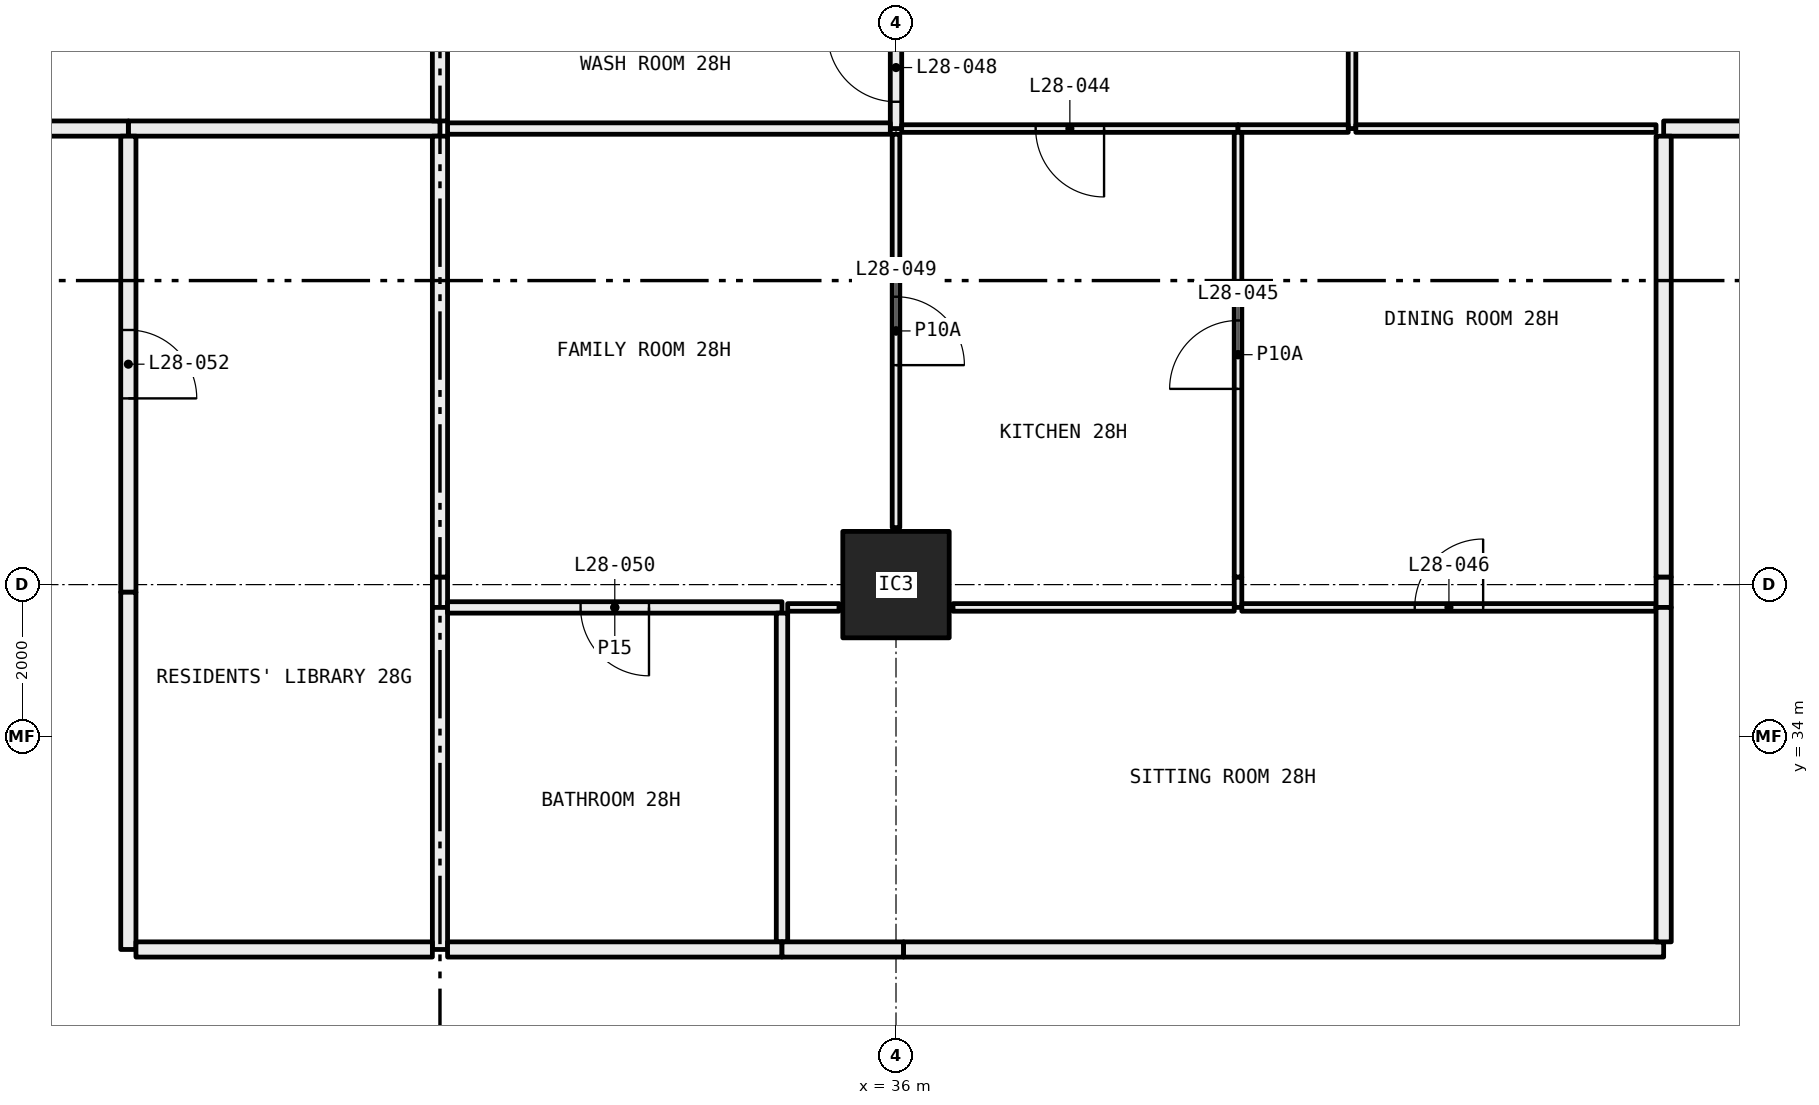
"""IFC4 building model, lengths in metres.
Left out: names, types, materials, properties, quantities, classifications, styles, units other than length and angle.
Written with IfcOpenShell. Run it as: python <this file> out.ifc"""

import sys

from ifc_helpers import new_model, si_unit, direction, frame, frame_2d, origin, origin_2d, place, context, subcontext, project, spatial, rectangle, hollow_rectangle, extrude, element, fill, save


model = new_model("IFC4")
c1 = context("Model", 3, precision=1e-05, world=origin(), true_north=direction((0.0, 1.0)))
c2 = subcontext(c1, "Body", "Model", "MODEL_VIEW")
j1 = project(units=[si_unit("LENGTHUNIT", "METRE"), si_unit("PLANEANGLEUNIT", "RADIAN")], contexts=[c1])
p1 = place(None, origin())
s1 = spatial("IfcSite", under=j1, at=p1, CompositionType="ELEMENT")
p2 = place(p1, origin())
s2 = spatial("IfcBuilding", under=s1, at=p2, CompositionType="ELEMENT")
p3 = place(p2, frame((0.0, 0.0, 110.4)))
s3 = spatial("IfcBuildingStorey", under=s2, at=p3, CompositionType="ELEMENT", Elevation=110.4)
p4 = place(p3, frame((36.0, 36.0, 0.0), z_axis=(0.0, 0.0, 1.0), x_axis=(1.0, 0.0, 0.0)))
e1 = element("IfcColumn", 1, at=p4, inside=s3, PredefinedType="COLUMN", context=c2, shape_type="SweptSolid", body=[
    extrude(hollow_rectangle(XDim=1.4, YDim=1.4, WallThickness=0.06, at=origin_2d()), origin(), (0.0, 0.0, 1.0), 3.05),
])
p5 = place(p3, frame((25.9, 42.0, 0.0), z_axis=(0.0, 0.0, 1.0), x_axis=(1.0, 0.0, 0.0)))
e2 = element("IfcWall", 2, at=p5, inside=s3, PredefinedType="PARTITIONING", context=c2, shape_type="SweptSolid", body=[
    extrude(rectangle(XDim=4.1, YDim=0.2, at=frame_2d((2.05, 0.0))), origin(), (0.0, 0.0, 1.0), 3.05),
])
p6 = place(p3, frame((30.0, 42.1, 0.0), z_axis=(0.0, 0.0, 1.0), x_axis=(0.0, 1.0, 0.0)))
e3 = element("IfcWall", 3, at=p6, inside=s3, PredefinedType="PARTITIONING", context=c2, shape_type="SweptSolid", body=[
    extrude(rectangle(XDim=1.58, YDim=0.2, at=frame_2d((0.79, 0.0))), origin(), (0.0, 0.0, 1.0), 3.05),
])
p7 = place(p3, frame((24.0, 42.0, 0.0), z_axis=(0.0, 0.0, 1.0), x_axis=(1.0, 0.0, 0.0)))
e4 = element("IfcWall", 4, at=p7, inside=s3, PredefinedType="PARTITIONING", context=c2, shape_type="SweptSolid", body=[
    extrude(rectangle(XDim=1.9, YDim=0.2, at=frame_2d((0.95, 0.0))), origin(), (0.0, 0.0, 1.0), 3.05),
])
p8 = place(p3, frame((30.0, 35.7, 0.0), z_axis=(0.0, 0.0, 1.0), x_axis=(0.0, 1.0, 0.0)))
e5 = element("IfcWall", 5, at=p8, inside=s3, PredefinedType="PARTITIONING", context=c2, shape_type="SweptSolid", body=[
    extrude(rectangle(XDim=0.4, YDim=0.2, at=frame_2d((0.2, 0.0))), origin(), (0.0, 0.0, 1.0), 2.45),
])
p9 = place(p3, frame((30.0, 36.1, 0.0), z_axis=(0.0, 0.0, 1.0), x_axis=(0.0, 1.0, 0.0)))
e6 = element("IfcWall", 6, at=p9, inside=s3, PredefinedType="PARTITIONING", context=c2, shape_type="SweptSolid", body=[
    extrude(rectangle(XDim=5.8, YDim=0.2, at=frame_2d((2.9, 0.0))), origin(), (0.0, 0.0, 1.0), 3.05),
])
p10 = place(p3, frame((30.0, 31.2, 0.0), z_axis=(0.0, 0.0, 1.0), x_axis=(0.0, 1.0, 0.0)))
e7 = element("IfcWall", 7, at=p10, inside=s3, PredefinedType="PARTITIONING", context=c2, shape_type="SweptSolid", body=[
    extrude(rectangle(XDim=4.5, YDim=0.2, at=frame_2d((2.25, 0.0))), origin(), (0.0, 0.0, 1.0), 3.05),
])
p11 = place(p3, frame((25.9, 41.9, 0.0), z_axis=(0.0, 0.0, 1.0), x_axis=(0.0, -1.0, 0.0)))
e8 = element("IfcWall", 8, at=p11, inside=s3, PredefinedType="PARTITIONING", context=c2, shape_type="SweptSolid", body=[
    extrude(rectangle(XDim=6.0, YDim=0.2, at=frame_2d((3.0, 0.0))), origin(), (0.0, 0.0, 1.0), 2.45),
])
p12 = place(p11, frame((2.55, 0.0, 0.0)))
e9 = element("IfcOpeningElement", 9, at=p12, cuts=e8, PredefinedType="OPENING", context=c2, shape_type="SweptSolid", body=[
    extrude(rectangle(XDim=0.9, YDim=2.1, at=frame_2d((0.45, 1.05))), frame((0.0, 0.11, 0.0), z_axis=(0.0, -1.0, 0.0), x_axis=(1.0, 0.0, 0.0)), (0.0, 0.0, 1.0), 0.22),
])
p13 = place(p3, frame((25.9, 35.9, 0.0), z_axis=(0.0, 0.0, 1.0), x_axis=(0.0, -1.0, 0.0)))
e10 = element("IfcWall", 10, at=p13, inside=s3, PredefinedType="PARTITIONING", context=c2, shape_type="SweptSolid", body=[
    extrude(rectangle(XDim=4.7, YDim=0.2, at=frame_2d((2.35, 0.0))), origin(), (0.0, 0.0, 1.0), 3.05),
])
p14 = place(p3, frame((26.0, 31.2, 0.0), z_axis=(0.0, 0.0, 1.0), x_axis=(1.0, 0.0, 0.0)))
e11 = element("IfcWall", 11, at=p14, inside=s3, PredefinedType="PARTITIONING", context=c2, shape_type="SweptSolid", body=[
    extrude(rectangle(XDim=3.9, YDim=0.2, at=frame_2d((1.95, 0.0))), origin(), (0.0, 0.0, 1.0), 3.05),
])
p15 = place(p3, frame((36.0, 42.0, 0.0), z_axis=(0.0, 0.0, 1.0), x_axis=(0.0, 1.0, 0.0)))
e12 = element("IfcWall", 12, at=p15, inside=s3, PredefinedType="PARTITIONING", context=c2, shape_type="SweptSolid", body=[
    extrude(rectangle(XDim=1.605, YDim=0.15, at=frame_2d((0.802, 0.0))), origin(), (0.0, 0.0, 1.0), 2.45),
])
p16 = place(p15, frame((0.353, 0.0, 0.0)))
e13 = element("IfcOpeningElement", 13, at=p16, cuts=e12, PredefinedType="OPENING", context=c2, shape_type="SweptSolid", body=[
    extrude(rectangle(XDim=0.9, YDim=2.1, at=frame_2d((0.45, 1.05))), frame((0.0, 0.085, 0.0), z_axis=(0.0, -1.0, 0.0), x_axis=(1.0, 0.0, 0.0)), (0.0, 0.0, 1.0), 0.17),
])
p17 = place(p3, frame((30.1, 42.0, 0.0), z_axis=(0.0, 0.0, 1.0), x_axis=(1.0, 0.0, 0.0)))
e14 = element("IfcWall", 14, at=p17, inside=s3, PredefinedType="PARTITIONING", context=c2, shape_type="SweptSolid", body=[
    extrude(rectangle(XDim=5.825, YDim=0.15, at=frame_2d((2.913, 0.0))), origin(), (0.0, 0.0, 1.0), 2.45),
])
p18 = place(p3, frame((42.0, 42.0, 0.0), z_axis=(0.0, 0.0, 1.0), x_axis=(0.0, 1.0, 0.0)))
e15 = element("IfcWall", 15, at=p18, inside=s3, PredefinedType="PARTITIONING", context=c2, shape_type="SweptSolid", body=[
    extrude(rectangle(XDim=5.28, YDim=0.1, at=frame_2d((2.64, 0.0))), origin(), (0.0, 0.0, 1.0), 3.05),
])
p19 = place(p18, frame((2.19, 0.0, 0.0)))
e16 = element("IfcOpeningElement", 16, at=p19, cuts=e15, PredefinedType="OPENING", context=c2, shape_type="SweptSolid", body=[
    extrude(rectangle(XDim=0.9, YDim=2.1, at=frame_2d((0.45, 1.05))), frame((0.0, 0.06, 0.0), z_axis=(0.0, -1.0, 0.0), x_axis=(1.0, 0.0, 0.0)), (0.0, 0.0, 1.0), 0.12),
])
p20 = place(p3, frame((36.075, 42.0, 0.0), z_axis=(0.0, 0.0, 1.0), x_axis=(1.0, 0.0, 0.0)))
e17 = element("IfcWall", 17, at=p20, inside=s3, PredefinedType="PARTITIONING", context=c2, shape_type="SweptSolid", body=[
    extrude(rectangle(XDim=4.425, YDim=0.1, at=frame_2d((2.212, 0.0))), origin(), (0.0, 0.0, 1.0), 2.45),
])
p21 = place(p20, frame((1.762, 0.0, 0.0)))
e18 = element("IfcOpeningElement", 18, at=p21, cuts=e17, PredefinedType="OPENING", context=c2, shape_type="SweptSolid", body=[
    extrude(rectangle(XDim=0.9, YDim=2.1, at=frame_2d((0.45, 1.05))), frame((0.0, 0.06, 0.0), z_axis=(0.0, -1.0, 0.0), x_axis=(1.0, 0.0, 0.0)), (0.0, 0.0, 1.0), 0.12),
])
p22 = place(p3, frame((40.5, 42.0, 0.0), z_axis=(0.0, 0.0, 1.0), x_axis=(1.0, 0.0, 0.0)))
e19 = element("IfcWall", 19, at=p22, inside=s3, PredefinedType="PARTITIONING", context=c2, shape_type="SweptSolid", body=[
    extrude(rectangle(XDim=1.45, YDim=0.1, at=frame_2d((0.725, 0.0))), origin(), (0.0, 0.0, 1.0), 3.05),
])
p23 = place(p3, frame((42.05, 42.0, 0.0), z_axis=(0.0, 0.0, 1.0), x_axis=(1.0, 0.0, 0.0)))
e20 = element("IfcWall", 20, at=p23, inside=s3, PredefinedType="PARTITIONING", context=c2, shape_type="SweptSolid", body=[
    extrude(rectangle(XDim=3.95, YDim=0.1, at=frame_2d((1.975, 0.0))), origin(), (0.0, 0.0, 1.0), 3.05),
])
p24 = place(p3, frame((46.1, 42.0, 0.0), z_axis=(0.0, 0.0, 1.0), x_axis=(1.0, 0.0, 0.0)))
e21 = element("IfcWall", 21, at=p24, inside=s3, PredefinedType="PARTITIONING", context=c2, shape_type="SweptSolid", body=[
    extrude(rectangle(XDim=1.9, YDim=0.2, at=frame_2d((0.95, 0.0))), origin(), (0.0, 0.0, 1.0), 3.05),
])
p25 = place(p3, frame((36.0, 36.75, 0.0), z_axis=(0.0, 0.0, 1.0), x_axis=(0.0, 1.0, 0.0)))
e22 = element("IfcWall", 22, at=p25, inside=s3, PredefinedType="PARTITIONING", context=c2, shape_type="SweptSolid", body=[
    extrude(rectangle(XDim=5.175, YDim=0.1, at=frame_2d((2.587, 0.0))), origin(), (0.0, 0.0, 1.0), 2.45),
])
p26 = place(p25, frame((2.137, 0.0, 0.0)))
e23 = element("IfcOpeningElement", 23, at=p26, cuts=e22, PredefinedType="OPENING", context=c2, shape_type="SweptSolid", body=[
    extrude(rectangle(XDim=0.9, YDim=2.1, at=frame_2d((0.45, 1.05))), frame((0.0, 0.06, 0.0), z_axis=(0.0, -1.0, 0.0), x_axis=(1.0, 0.0, 0.0)), (0.0, 0.0, 1.0), 0.12),
])
p27 = place(p3, frame((30.1, 35.7, 0.0), z_axis=(0.0, 0.0, 1.0), x_axis=(1.0, 0.0, 0.0)))
e24 = element("IfcWall", 24, at=p27, inside=s3, PredefinedType="PARTITIONING", context=c2, shape_type="SweptSolid", body=[
    extrude(rectangle(XDim=4.4, YDim=0.15, at=frame_2d((2.2, 0.0))), origin(), (0.0, 0.0, 1.0), 3.05),
])
p28 = place(p27, frame((1.75, 0.0, 0.0)))
e25 = element("IfcOpeningElement", 25, at=p28, cuts=e24, PredefinedType="OPENING", context=c2, shape_type="SweptSolid", body=[
    extrude(rectangle(XDim=0.9, YDim=2.1, at=frame_2d((0.45, 1.05))), frame((0.0, 0.085, 0.0), z_axis=(0.0, -1.0, 0.0), x_axis=(1.0, 0.0, 0.0)), (0.0, 0.0, 1.0), 0.17),
])
p29 = place(p3, frame((34.575, 35.7, 0.0), z_axis=(0.0, 0.0, 1.0), x_axis=(1.0, 0.0, 0.0)))
e26 = element("IfcWall", 26, at=p29, inside=s3, PredefinedType="PARTITIONING", context=c2, shape_type="SweptSolid", body=[
    extrude(rectangle(XDim=0.675, YDim=0.1, at=frame_2d((0.337, 0.0))), origin(), (0.0, 0.0, 1.0), 3.05),
])
p30 = place(p3, frame((40.5, 35.7, 0.0), z_axis=(0.0, 0.0, 1.0), x_axis=(0.0, 1.0, 0.0)))
e27 = element("IfcWall", 27, at=p30, inside=s3, PredefinedType="PARTITIONING", context=c2, shape_type="SweptSolid", body=[
    extrude(rectangle(XDim=0.4, YDim=0.1, at=frame_2d((0.2, 0.0))), origin(), (0.0, 0.0, 1.0), 2.45),
])
p31 = place(p3, frame((40.5, 36.1, 0.0), z_axis=(0.0, 0.0, 1.0), x_axis=(0.0, 1.0, 0.0)))
e28 = element("IfcWall", 28, at=p31, inside=s3, PredefinedType="PARTITIONING", context=c2, shape_type="SweptSolid", body=[
    extrude(rectangle(XDim=5.85, YDim=0.1, at=frame_2d((2.925, 0.0))), origin(), (0.0, 0.0, 1.0), 3.05),
])
p32 = place(p31, frame((2.475, 0.0, 0.0)))
e29 = element("IfcOpeningElement", 29, at=p32, cuts=e28, PredefinedType="OPENING", context=c2, shape_type="SweptSolid", body=[
    extrude(rectangle(XDim=0.9, YDim=2.1, at=frame_2d((0.45, 1.05))), frame((0.0, 0.06, 0.0), z_axis=(0.0, -1.0, 0.0), x_axis=(1.0, 0.0, 0.0)), (0.0, 0.0, 1.0), 0.12),
])
p33 = place(p3, frame((36.75, 35.7, 0.0), z_axis=(0.0, 0.0, 1.0), x_axis=(1.0, 0.0, 0.0)))
e30 = element("IfcWall", 30, at=p33, inside=s3, PredefinedType="PARTITIONING", context=c2, shape_type="SweptSolid", body=[
    extrude(rectangle(XDim=3.7, YDim=0.1, at=frame_2d((1.85, 0.0))), origin(), (0.0, 0.0, 1.0), 3.05),
])
p34 = place(p3, frame((40.55, 35.7, 0.0), z_axis=(0.0, 0.0, 1.0), x_axis=(1.0, 0.0, 0.0)))
e31 = element("IfcWall", 31, at=p34, inside=s3, PredefinedType="PARTITIONING", context=c2, shape_type="SweptSolid", body=[
    extrude(rectangle(XDim=5.45, YDim=0.1, at=frame_2d((2.725, 0.0))), origin(), (0.0, 0.0, 1.0), 3.05),
])
p35 = place(p34, frame((2.275, 0.0, 0.0)))
e32 = element("IfcOpeningElement", 32, at=p35, cuts=e31, PredefinedType="OPENING", context=c2, shape_type="SweptSolid", body=[
    extrude(rectangle(XDim=0.9, YDim=2.1, at=frame_2d((0.45, 1.05))), frame((0.0, 0.06, 0.0), z_axis=(0.0, -1.0, 0.0), x_axis=(1.0, 0.0, 0.0)), (0.0, 0.0, 1.0), 0.12),
])
p36 = place(p3, frame((46.1, 35.7, 0.0), z_axis=(0.0, 0.0, 1.0), x_axis=(0.0, 1.0, 0.0)))
e33 = element("IfcWall", 33, at=p36, inside=s3, PredefinedType="PARTITIONING", context=c2, shape_type="SweptSolid", body=[
    extrude(rectangle(XDim=0.4, YDim=0.2, at=frame_2d((0.2, 0.0))), origin(), (0.0, 0.0, 1.0), 2.45),
])
p37 = place(p3, frame((46.1, 36.1, 0.0), z_axis=(0.0, 0.0, 1.0), x_axis=(0.0, 1.0, 0.0)))
e34 = element("IfcWall", 34, at=p37, inside=s3, PredefinedType="PARTITIONING", context=c2, shape_type="SweptSolid", body=[
    extrude(rectangle(XDim=5.8, YDim=0.2, at=frame_2d((2.9, 0.0))), origin(), (0.0, 0.0, 1.0), 3.05),
])
p38 = place(p3, frame((34.5, 31.3, 0.0), z_axis=(0.0, 0.0, 1.0), x_axis=(0.0, 1.0, 0.0)))
e35 = element("IfcWall", 35, at=p38, inside=s3, PredefinedType="PARTITIONING", context=c2, shape_type="SweptSolid", body=[
    extrude(rectangle(XDim=4.325, YDim=0.15, at=frame_2d((2.163, 0.0))), origin(), (0.0, 0.0, 1.0), 3.05),
])
p39 = place(p3, frame((30.1, 31.2, 0.0), z_axis=(0.0, 0.0, 1.0), x_axis=(1.0, 0.0, 0.0)))
e36 = element("IfcWall", 36, at=p39, inside=s3, PredefinedType="PARTITIONING", context=c2, shape_type="SweptSolid", body=[
    extrude(rectangle(XDim=4.4, YDim=0.2, at=frame_2d((2.2, 0.0))), origin(), (0.0, 0.0, 1.0), 3.05),
])
p40 = place(p3, frame((34.5, 31.2, 0.0), z_axis=(0.0, 0.0, 1.0), x_axis=(1.0, 0.0, 0.0)))
e37 = element("IfcWall", 37, at=p40, inside=s3, PredefinedType="PARTITIONING", context=c2, shape_type="SweptSolid", body=[
    extrude(rectangle(XDim=1.6, YDim=0.2, at=frame_2d((0.8, 0.0))), origin(), (0.0, 0.0, 1.0), 2.45),
])
p41 = place(p3, frame((36.1, 31.2, 0.0), z_axis=(0.0, 0.0, 1.0), x_axis=(1.0, 0.0, 0.0)))
e38 = element("IfcWall", 38, at=p41, inside=s3, PredefinedType="PARTITIONING", context=c2, shape_type="SweptSolid", body=[
    extrude(rectangle(XDim=10.0, YDim=0.2, at=frame_2d((5.0, 0.0))), origin(), (0.0, 0.0, 1.0), 3.05),
])
p42 = place(p3, frame((46.1, 31.3, 0.0), z_axis=(0.0, 0.0, 1.0), x_axis=(0.0, 1.0, 0.0)))
e39 = element("IfcWall", 39, at=p42, inside=s3, PredefinedType="PARTITIONING", context=c2, shape_type="SweptSolid", body=[
    extrude(rectangle(XDim=4.4, YDim=0.2, at=frame_2d((2.2, 0.0))), origin(), (0.0, 0.0, 1.0), 3.05),
])
p43 = place(p21, frame((0.9, 0.0, 0.0), x_axis=(-1.0, 0.0, 0.0)))
e40 = element("IfcDoor", 40, at=p43, inside=s3, OperationType="SINGLE_SWING_RIGHT", PredefinedType="DOOR", context=c2, shape_type="SweptSolid", body=[
    extrude(rectangle(XDim=0.9, YDim=2.1, at=frame_2d((0.45, 1.05))), frame((0.0, 0.025, 0.0), z_axis=(0.0, -1.0, 0.0), x_axis=(1.0, 0.0, 0.0)), (0.0, 0.0, 1.0), 0.05),
])
fill(e18, e40)
p44 = place(p32, origin())
e41 = element("IfcDoor", 41, at=p44, inside=s3, OperationType="SINGLE_SWING_RIGHT", PredefinedType="DOOR", context=c2, shape_type="SweptSolid", body=[
    extrude(rectangle(XDim=0.9, YDim=2.1, at=frame_2d((0.45, 1.05))), frame((0.0, 0.025, 0.0), z_axis=(0.0, -1.0, 0.0), x_axis=(1.0, 0.0, 0.0)), (0.0, 0.0, 1.0), 0.05),
])
fill(e29, e41)
p45 = place(p35, origin())
e42 = element("IfcDoor", 42, at=p45, inside=s3, OperationType="SINGLE_SWING_LEFT", PredefinedType="DOOR", context=c2, shape_type="SweptSolid", body=[
    extrude(rectangle(XDim=0.9, YDim=2.1, at=frame_2d((0.45, 1.05))), frame((0.0, 0.025, 0.0), z_axis=(0.0, -1.0, 0.0), x_axis=(1.0, 0.0, 0.0)), (0.0, 0.0, 1.0), 0.05),
])
fill(e32, e42)
p46 = place(p16, origin())
e43 = element("IfcDoor", 43, at=p46, inside=s3, OperationType="SINGLE_SWING_LEFT", PredefinedType="DOOR", context=c2, shape_type="SweptSolid", body=[
    extrude(rectangle(XDim=0.9, YDim=2.1, at=frame_2d((0.45, 1.05))), frame((0.0, 0.025, 0.0), z_axis=(0.0, -1.0, 0.0), x_axis=(1.0, 0.0, 0.0)), (0.0, 0.0, 1.0), 0.05),
])
fill(e13, e43)
p47 = place(p26, frame((0.9, 0.0, 0.0), x_axis=(-1.0, 0.0, 0.0)))
e44 = element("IfcDoor", 44, at=p47, inside=s3, OperationType="SINGLE_SWING_LEFT", PredefinedType="DOOR", context=c2, shape_type="SweptSolid", body=[
    extrude(rectangle(XDim=0.9, YDim=2.1, at=frame_2d((0.45, 1.05))), frame((0.0, 0.025, 0.0), z_axis=(0.0, -1.0, 0.0), x_axis=(1.0, 0.0, 0.0)), (0.0, 0.0, 1.0), 0.05),
])
fill(e23, e44)
p48 = place(p28, frame((0.9, 0.0, 0.0), x_axis=(-1.0, 0.0, 0.0)))
e45 = element("IfcDoor", 45, at=p48, inside=s3, OperationType="SINGLE_SWING_RIGHT", PredefinedType="DOOR", context=c2, shape_type="SweptSolid", body=[
    extrude(rectangle(XDim=0.9, YDim=2.1, at=frame_2d((0.45, 1.05))), frame((0.0, 0.025, 0.0), z_axis=(0.0, -1.0, 0.0), x_axis=(1.0, 0.0, 0.0)), (0.0, 0.0, 1.0), 0.05),
])
fill(e25, e45)
p49 = place(p12, origin())
e46 = element("IfcDoor", 46, at=p49, inside=s3, OperationType="SINGLE_SWING_LEFT", PredefinedType="DOOR", context=c2, shape_type="SweptSolid", body=[
    extrude(rectangle(XDim=0.9, YDim=2.1, at=frame_2d((0.45, 1.05))), frame((0.0, 0.025, 0.0), z_axis=(0.0, -1.0, 0.0), x_axis=(1.0, 0.0, 0.0)), (0.0, 0.0, 1.0), 0.05),
])
fill(e9, e46)
save(model, sys.argv[1])
